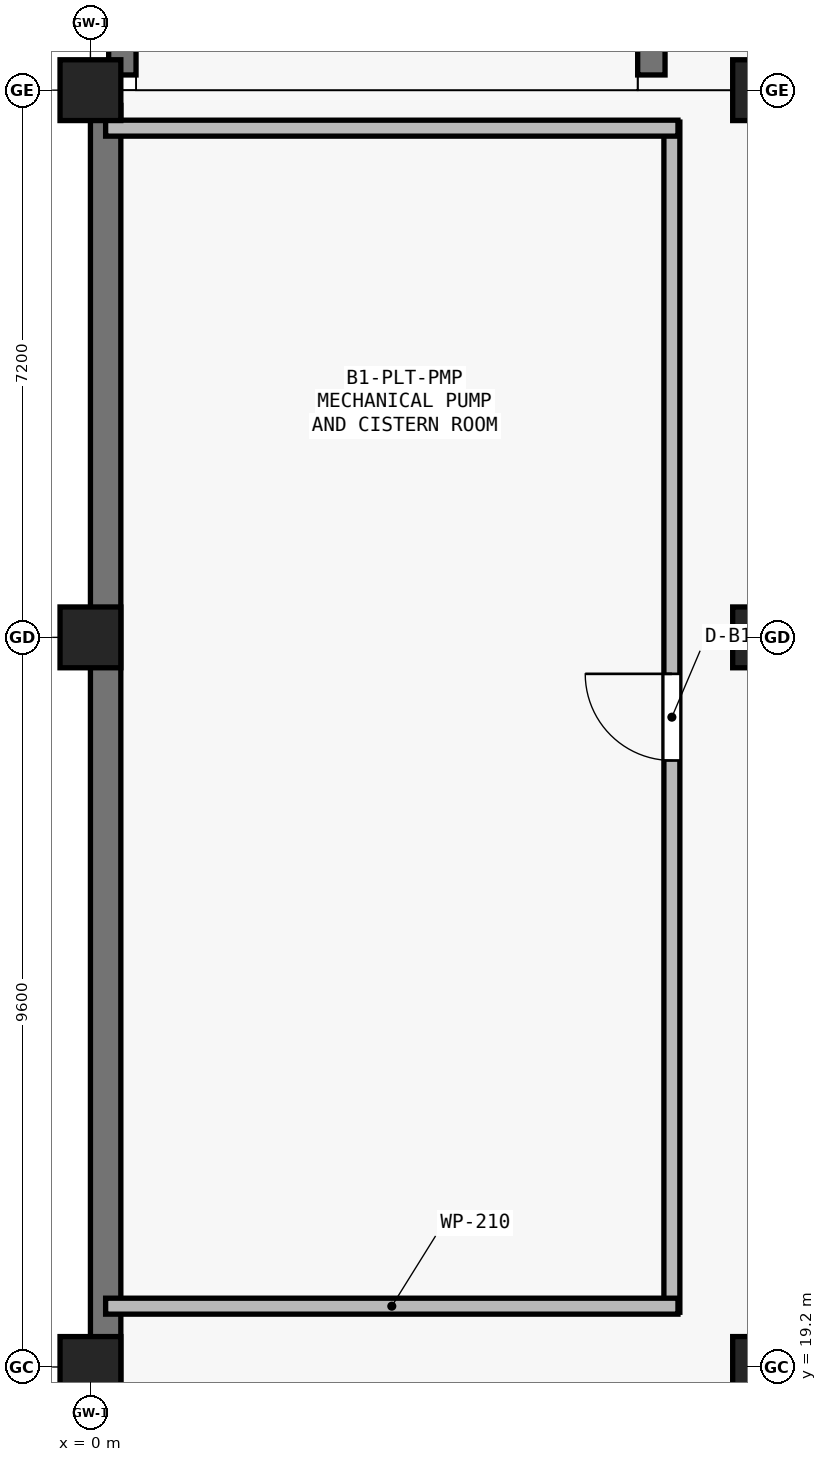
"""IFC4 building model, lengths in metres.
Left out: names, types, materials, properties, quantities, classifications, styles, units other than length and angle.
Written with IfcOpenShell. Run it as: python <this file> out.ifc"""

import sys

from ifc_helpers import new_model, si_unit, direction, frame, frame_2d, origin, origin_2d, place, context, subcontext, project, spatial, rectangle, extrude, element, fill, save


model = new_model("IFC4")
c1 = context("Model", 3, precision=1e-05, world=origin(), true_north=direction((0.0, 1.0)))
c2 = subcontext(c1, "Body", "Model", "MODEL_VIEW")
j1 = project(units=[si_unit("LENGTHUNIT", "METRE"), si_unit("PLANEANGLEUNIT", "RADIAN")], contexts=[c1])
p1 = place(None, origin())
s1 = spatial("IfcSite", under=j1, at=p1, CompositionType="ELEMENT")
p2 = place(p1, origin())
s2 = spatial("IfcBuilding", under=s1, at=p2, CompositionType="ELEMENT")
p3 = place(p2, frame((0.0, 0.0, -5.4)))
s3 = spatial("IfcBuildingStorey", under=s2, at=p3, CompositionType="ELEMENT", Elevation=-5.4)
for number, where, z_axis, x_axis in (
    (1, (0.0, 19.2, 0.0), (0.0, 0.0, 1.0), (1.0, 0.0, 0.0)),
    (2, (0.0, 28.8, 0.0), (0.0, 0.0, 1.0), (1.0, 0.0, 0.0)),
    (3, (0.0, 36.0, 0.0), (0.0, 0.0, 1.0), (1.0, 0.0, 0.0)),
    (4, (8.85, 19.2, 0.0), (0.0, 0.0, 1.0), (1.0, 0.0, 0.0)),
    (5, (8.85, 28.8, 0.0), (0.0, 0.0, 1.0), (1.0, 0.0, 0.0)),
    (6, (8.85, 36.0, 0.0), (0.0, 0.0, 1.0), (1.0, 0.0, 0.0)),
):
    element("IfcColumn", number, at=place(p3, frame(where, z_axis=z_axis, x_axis=x_axis)), inside=s3, PredefinedType="COLUMN", context=c2, shape_type="SweptSolid", body=[
        extrude(rectangle(XDim=0.8, YDim=0.8, at=origin_2d()), origin(), (0.0, 0.0, 1.0), 5.4),
    ])
p4 = place(p3, frame((0.2, 0.2, 0.0), z_axis=(0.0, 0.0, 1.0), x_axis=(0.0, 1.0, 0.0)))
e7 = element("IfcWall", 7, at=p4, inside=s3, PredefinedType="USERDEFINED", context=c2, shape_type="SweptSolid", body=[
    extrude(rectangle(XDim=35.6, YDim=0.4, at=frame_2d((17.8, 0.0))), origin(), (0.0, 0.0, 1.0), 4.85),
])
for number, where, z_axis, x_axis in (
    (8, (0.42, 36.2, 0.0), (0.0, 0.0, 1.0), (0.0, 1.0, 0.0)),
    (9, (7.38, 84.2, 0.0), (0.0, 0.0, 1.0), (0.0, -1.0, 0.0)),
):
    element("IfcWall", number, at=place(p3, frame(where, z_axis=z_axis, x_axis=x_axis)), inside=s3, PredefinedType="USERDEFINED", context=c2, shape_type="SweptSolid", body=[
        extrude(rectangle(XDim=48.0, YDim=0.36, at=frame_2d((24.0, 0.0))), origin(), (0.0, 0.0, 1.0), 9.0),
    ])
p5 = place(p3, frame((7.65, 19.92, 0.0), z_axis=(0.0, 0.0, 1.0), x_axis=(0.0, 1.0, 0.0)))
e10 = element("IfcWall", 10, at=p5, inside=s3, PredefinedType="PARTITIONING", context=c2, shape_type="SweptSolid", body=[
    extrude(rectangle(XDim=15.66, YDim=0.21, at=frame_2d((7.83, 0.0))), origin(), (0.0, 0.0, 1.0), 4.92),
])
p6 = place(p5, frame((7.26, 0.0, 0.0)))
e11 = element("IfcOpeningElement", 11, at=p6, cuts=e10, PredefinedType="OPENING", context=c2, shape_type="SweptSolid", body=[
    extrude(rectangle(XDim=1.14, YDim=2.1, at=frame_2d((0.57, 1.05))), frame((0.0, 0.115, 0.0), z_axis=(0.0, -1.0, 0.0), x_axis=(1.0, 0.0, 0.0)), (0.0, 0.0, 1.0), 0.23),
])
for number, where, z_axis, x_axis in (
    (12, (0.2, 20.0, 0.0), (0.0, 0.0, 1.0), (1.0, 0.0, 0.0)),
    (13, (7.73, 35.5, 0.0), (0.0, 0.0, 1.0), (-1.0, 0.0, 0.0)),
):
    element("IfcWall", number, at=place(p3, frame(where, z_axis=z_axis, x_axis=x_axis)), inside=s3, PredefinedType="PARTITIONING", context=c2, shape_type="SweptSolid", body=[
        extrude(rectangle(XDim=7.53, YDim=0.21, at=frame_2d((3.765, 0.0))), origin(), (0.0, 0.0, 1.0), 4.92),
    ])
p7 = place(p6, origin())
e14 = element("IfcDoor", 14, at=p7, inside=s3, OperationType="SINGLE_SWING_RIGHT", PredefinedType="DOOR", context=c2, shape_type="SweptSolid", body=[
    extrude(rectangle(XDim=1.14, YDim=2.1, at=frame_2d((0.57, 1.05))), frame((0.0, 0.025, 0.0), z_axis=(0.0, -1.0, 0.0), x_axis=(1.0, 0.0, 0.0)), (0.0, 0.0, 1.0), 0.05),
])
fill(e11, e14)
save(model, sys.argv[1])
